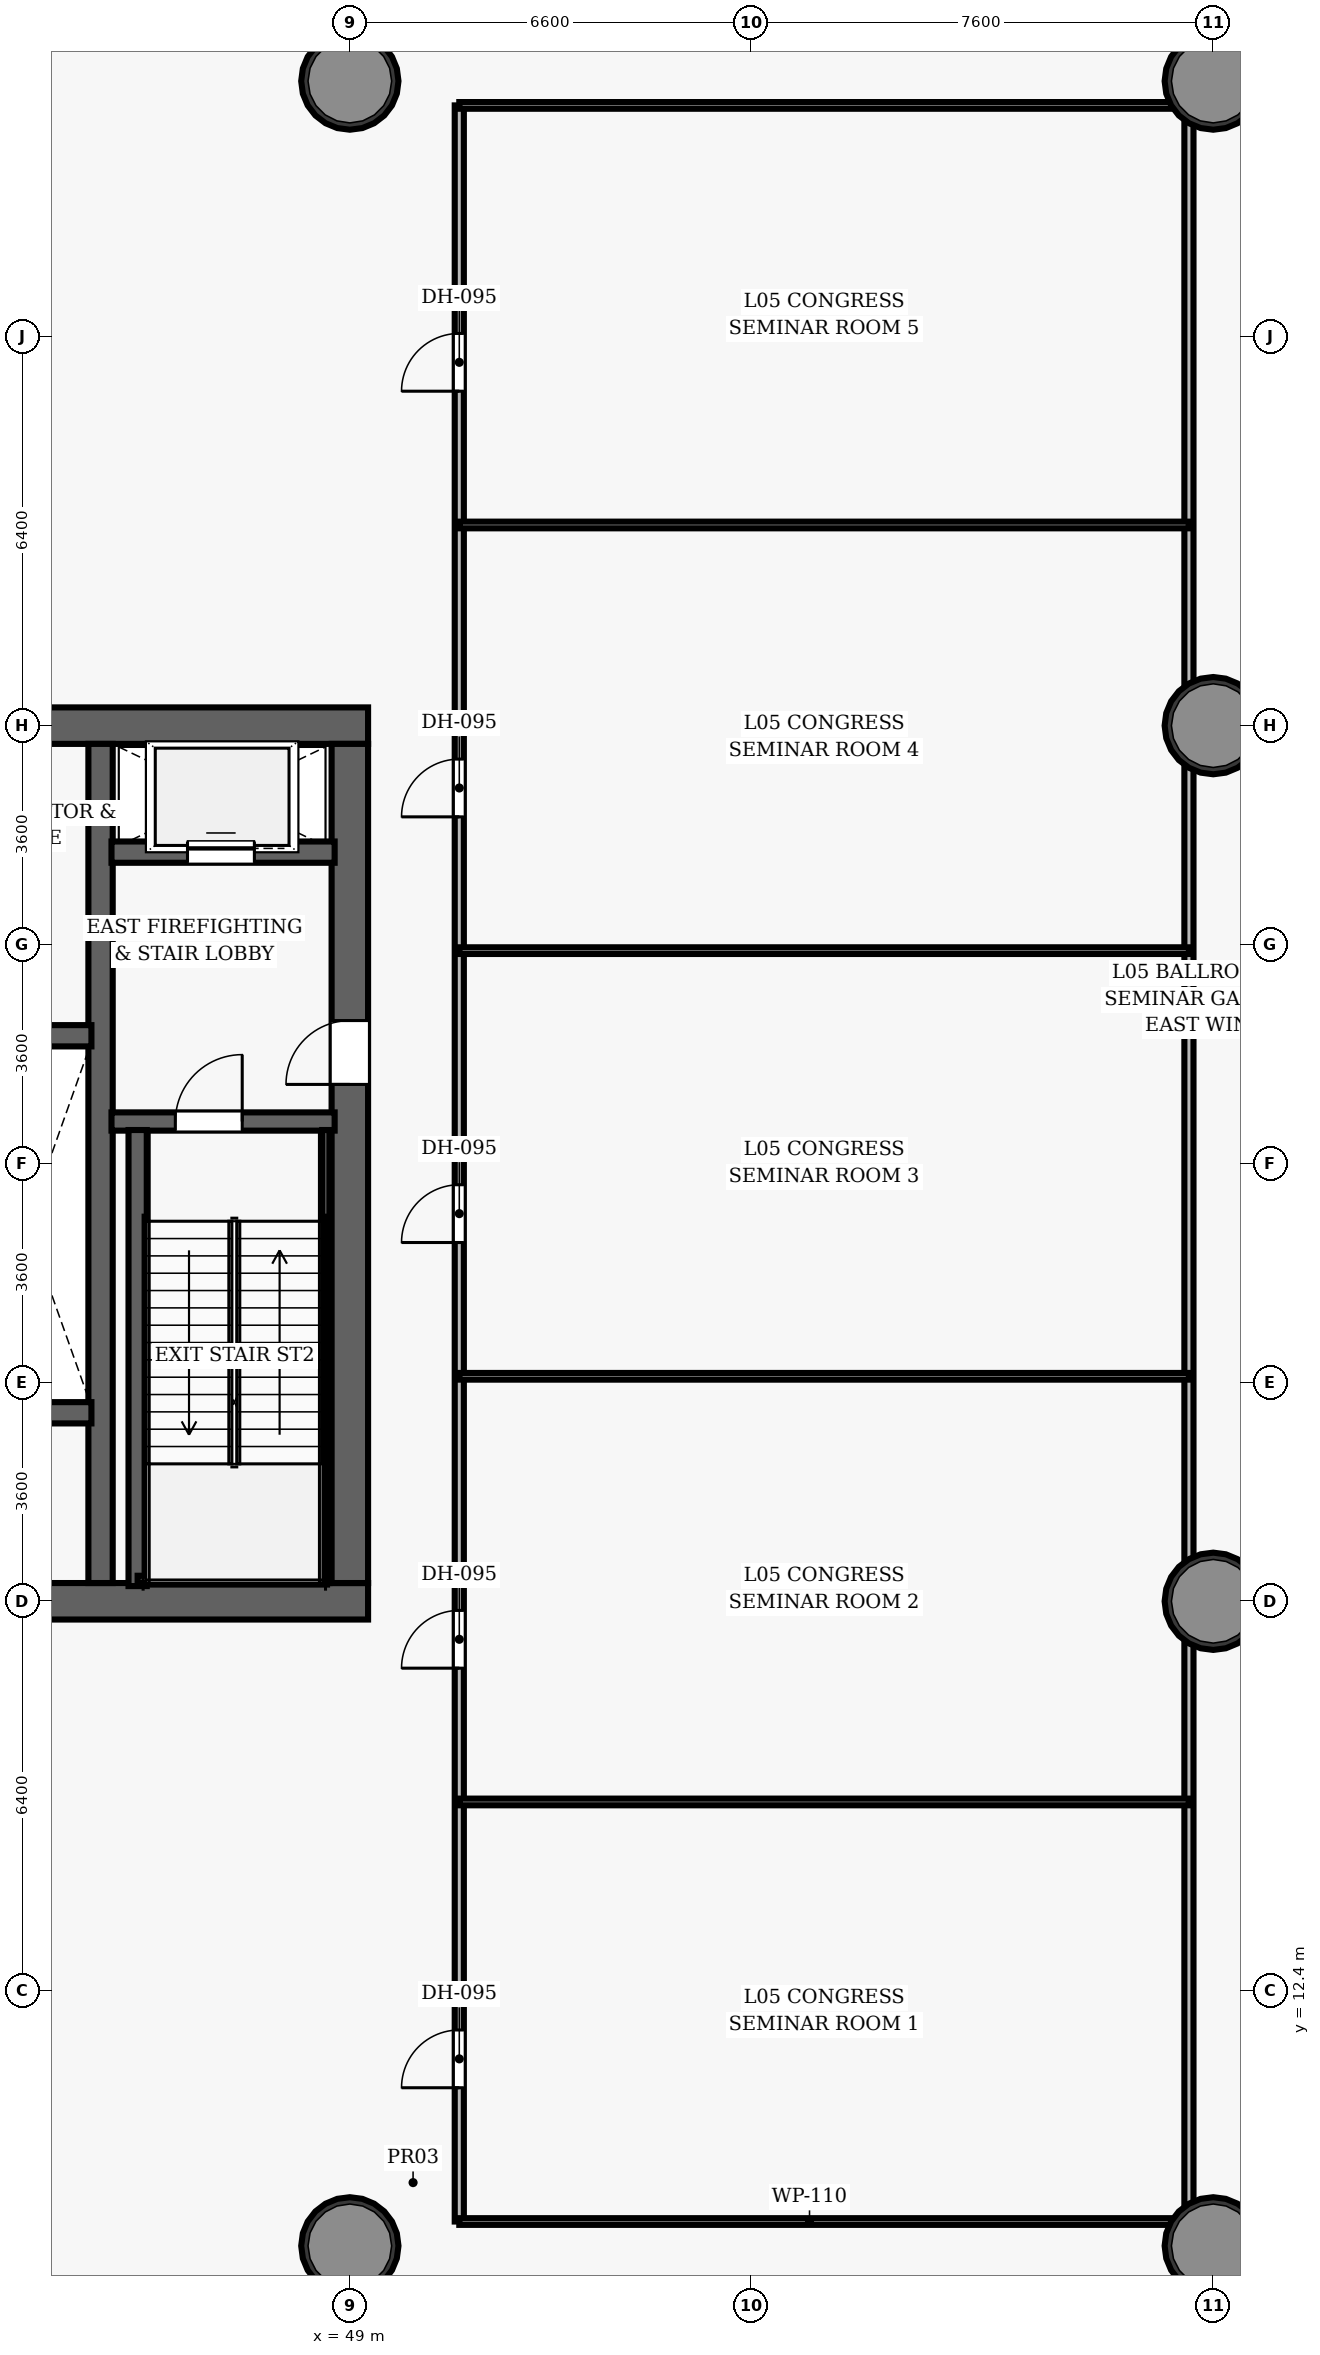
"""IFC4 building model, lengths in metres.
Left out: names, types, materials, properties, quantities, classifications, styles, units other than length and angle.
Written with IfcOpenShell. Run it as: python <this file> out.ifc"""

import sys

from ifc_helpers import new_model, si_unit, direction, frame, frame_2d, origin, origin_2d, place, context, subcontext, project, spatial, rectangle, hollow_circle, extrude, element, fill, save


model = new_model("IFC4")
c1 = context("Model", 3, precision=1e-05, world=origin(), true_north=direction((0.0, 1.0)))
c2 = subcontext(c1, "Body", "Model", "MODEL_VIEW")
j1 = project(units=[si_unit("LENGTHUNIT", "METRE"), si_unit("PLANEANGLEUNIT", "RADIAN")], contexts=[c1])
p1 = place(None, origin())
s1 = spatial("IfcSite", under=j1, at=p1, CompositionType="ELEMENT")
p2 = place(p1, origin())
s2 = spatial("IfcBuilding", under=s1, at=p2, CompositionType="ELEMENT")
p3 = place(p2, frame((0.0, 0.0, 30.0)))
s3 = spatial("IfcBuildingStorey", under=s2, at=p3, CompositionType="ELEMENT", Elevation=30.0)
p4 = place(p3, frame((26.7, 18.8, 0.0), z_axis=(0.0, 0.0, 1.0), x_axis=(1.0, 0.0, 0.0)))
e1 = element("IfcWall", 1, at=p4, inside=s3, PredefinedType="SHEAR", context=c2, shape_type="SweptSolid", body=[
    extrude(rectangle(XDim=22.6, YDim=0.6, at=frame_2d((11.3, 0.0))), origin(), (0.0, 0.0, 1.0), 5.4),
])
p5 = place(p4, frame((14.52, 0.0, 0.0)))
e2 = element("IfcOpeningElement", 2, at=p5, cuts=e1, PredefinedType="OPENING", context=c2, shape_type="SweptSolid", body=[
    extrude(rectangle(XDim=1.05, YDim=2.15, at=frame_2d((0.525, 1.075))), frame((0.0, 0.31, 0.0), z_axis=(0.0, -1.0, 0.0), x_axis=(1.0, 0.0, 0.0)), (0.0, 0.0, 1.0), 0.62),
])
p6 = place(p3, frame((26.7, 33.2, 0.0), z_axis=(0.0, 0.0, 1.0), x_axis=(1.0, 0.0, 0.0)))
e3 = element("IfcWall", 3, at=p6, inside=s3, PredefinedType="SHEAR", context=c2, shape_type="SweptSolid", body=[
    extrude(rectangle(XDim=22.6, YDim=0.6, at=frame_2d((11.3, 0.0))), origin(), (0.0, 0.0, 1.0), 5.4),
])
p7 = place(p6, frame((4.62, 0.0, 0.0)))
e4 = element("IfcOpeningElement", 4, at=p7, cuts=e3, PredefinedType="OPENING", context=c2, shape_type="SweptSolid", body=[
    extrude(rectangle(XDim=1.05, YDim=2.15, at=frame_2d((0.525, 1.075))), frame((0.0, 0.31, 0.0), z_axis=(0.0, -1.0, 0.0), x_axis=(1.0, 0.0, 0.0)), (0.0, 0.0, 1.0), 0.62),
])
p8 = place(p6, frame((14.52, 0.0, 0.0)))
e5 = element("IfcOpeningElement", 5, at=p8, cuts=e3, PredefinedType="OPENING", context=c2, shape_type="SweptSolid", body=[
    extrude(rectangle(XDim=1.05, YDim=2.15, at=frame_2d((0.525, 1.075))), frame((0.0, 0.31, 0.0), z_axis=(0.0, -1.0, 0.0), x_axis=(1.0, 0.0, 0.0)), (0.0, 0.0, 1.0), 0.62),
])
p9 = place(p3, frame((49.0, 19.1, 0.0), z_axis=(0.0, 0.0, 1.0), x_axis=(0.0, 1.0, 0.0)))
e6 = element("IfcWall", 6, at=p9, inside=s3, PredefinedType="SHEAR", context=c2, shape_type="SweptSolid", body=[
    extrude(rectangle(XDim=13.8, YDim=0.6, at=frame_2d((6.9, 0.0))), origin(), (0.0, 0.0, 1.0), 5.4),
])
p10 = place(p9, frame((8.2, 0.0, 0.0)))
e7 = element("IfcOpeningElement", 7, at=p10, cuts=e6, PredefinedType="OPENING", context=c2, shape_type="SweptSolid", body=[
    extrude(rectangle(XDim=1.05, YDim=2.15, at=frame_2d((0.525, 1.075))), frame((0.0, 0.31, 0.0), z_axis=(0.0, -1.0, 0.0), x_axis=(1.0, 0.0, 0.0)), (0.0, 0.0, 1.0), 0.62),
])
p11 = place(p3, frame((44.9, 19.1, 0.0), z_axis=(0.0, 0.0, 1.0), x_axis=(0.0, 1.0, 0.0)))
e8 = element("IfcWall", 8, at=p11, inside=s3, PredefinedType="SHEAR", context=c2, shape_type="SweptSolid", body=[
    extrude(rectangle(XDim=13.8, YDim=0.4, at=frame_2d((6.9, 0.0))), origin(), (0.0, 0.0, 1.0), 5.4),
])
for number, where, z_axis, x_axis in (
    (9, (49.0, 8.2, 0.0), (0.0, 0.0, 1.0), (1.0, 0.0, 0.0)),
    (10, (63.2, 8.2, 0.0), (0.0, 0.0, 1.0), (1.0, 0.0, 0.0)),
    (11, (63.2, 18.8, 0.0), (0.0, 0.0, 1.0), (1.0, 0.0, 0.0)),
    (12, (63.2, 33.2, 0.0), (0.0, 0.0, 1.0), (1.0, 0.0, 0.0)),
    (13, (49.0, 43.8, 0.0), (0.0, 0.0, 1.0), (1.0, 0.0, 0.0)),
    (14, (63.2, 43.8, 0.0), (0.0, 0.0, 1.0), (1.0, 0.0, 0.0)),
):
    element("IfcColumn", number, at=place(p3, frame(where, z_axis=z_axis, x_axis=x_axis)), inside=s3, PredefinedType="COLUMN", context=c2, shape_type="SweptSolid", body=[
        extrude(hollow_circle(Radius=0.8, WallThickness=0.06, at=origin_2d()), origin(), (0.0, 0.0, 1.0), 5.4),
    ])
p12 = place(p3, frame((45.08, 26.69, 0.0), z_axis=(0.0, 0.0, 1.0), x_axis=(1.0, 0.0, 0.0)))
e15 = element("IfcWall", 15, at=p12, inside=s3, PredefinedType="SHEAR", context=c2, shape_type="SweptSolid", body=[
    extrude(rectangle(XDim=3.67, YDim=0.3, at=frame_2d((1.835, 0.0))), origin(), (0.0, 0.0, 1.0), 5.4),
])
p13 = place(p12, frame((1.05, 0.0, 0.0)))
e16 = element("IfcOpeningElement", 16, at=p13, cuts=e15, PredefinedType="OPENING", context=c2, shape_type="SweptSolid", body=[
    extrude(rectangle(XDim=1.1, YDim=2.15, at=frame_2d((0.55, 1.075))), frame((0.0, 0.16, 0.0), z_axis=(0.0, -1.0, 0.0), x_axis=(1.0, 0.0, 0.0)), (0.0, 0.0, 1.0), 0.32),
])
p14 = place(p3, frame((45.51, 19.05, 0.0), z_axis=(0.0, 0.0, 1.0), x_axis=(0.0, 1.0, 0.0)))
e17 = element("IfcWall", 17, at=p14, inside=s3, PredefinedType="SHEAR", context=c2, shape_type="SweptSolid", body=[
    extrude(rectangle(XDim=7.5, YDim=0.3, at=frame_2d((3.75, 0.0))), origin(), (0.0, 0.0, 1.0), 5.4),
])
p15 = place(p3, frame((48.605, 19.1, 0.0), z_axis=(0.0, 0.0, 1.0), x_axis=(0.0, 1.0, 0.0)))
e18 = element("IfcWall", 18, at=p15, inside=s3, PredefinedType="SHEAR", context=c2, shape_type="SweptSolid", body=[
    extrude(rectangle(XDim=7.45, YDim=0.12, at=frame_2d((3.725, 0.0))), origin(), (0.0, 0.0, 1.0), 5.4),
])
p16 = place(p3, frame((45.51, 19.16, 0.0), z_axis=(0.0, 0.0, 1.0), x_axis=(1.0, 0.0, 0.0)))
e19 = element("IfcWall", 19, at=p16, inside=s3, PredefinedType="SHEAR", context=c2, shape_type="SweptSolid", body=[
    extrude(rectangle(XDim=3.095, YDim=0.12, at=frame_2d((1.547, 0.0))), origin(), (0.0, 0.0, 1.0), 5.4),
])
p17 = place(p3, frame((45.08, 31.12, 0.0), z_axis=(0.0, 0.0, 1.0), x_axis=(1.0, 0.0, 0.0)))
e20 = element("IfcWall", 20, at=p17, inside=s3, PredefinedType="SHEAR", context=c2, shape_type="SweptSolid", body=[
    extrude(rectangle(XDim=3.67, YDim=0.35, at=frame_2d((1.835, 0.0))), origin(), (0.0, 0.0, 1.0), 4.06),
])
p18 = place(p17, frame((1.25, 0.0, 0.0)))
e21 = element("IfcOpeningElement", 21, at=p18, cuts=e20, PredefinedType="OPENING", context=c2, shape_type="SweptSolid", body=[
    extrude(rectangle(XDim=1.1, YDim=2.15, at=frame_2d((0.55, 1.075))), frame((0.0, 0.185, 0.0), z_axis=(0.0, -1.0, 0.0), x_axis=(1.0, 0.0, 0.0)), (0.0, 0.0, 1.0), 0.37),
])
for number, where, z_axis, x_axis in (
    (22, (42.72, 21.9, 0.0), (0.0, 0.0, 1.0), (1.0, 0.0, 0.0)),
    (23, (42.72, 28.1, 0.0), (0.0, 0.0, 1.0), (1.0, 0.0, 0.0)),
):
    element("IfcWall", number, at=place(p3, frame(where, z_axis=z_axis, x_axis=x_axis)), inside=s3, PredefinedType="SHEAR", context=c2, shape_type="SweptSolid", body=[
        extrude(rectangle(XDim=2.03, YDim=0.35, at=frame_2d((1.015, 0.0))), origin(), (0.0, 0.0, 1.0), 4.06),
    ])
p19 = place(p3, frame((50.8, 8.6, 0.0), z_axis=(0.0, 0.0, 1.0), x_axis=(0.0, 1.0, 0.0)))
e24 = element("IfcWall", 24, at=p19, inside=s3, PredefinedType="PARTITIONING", context=c2, shape_type="SweptSolid", body=[
    extrude(rectangle(XDim=34.8, YDim=0.15, at=frame_2d((17.4, 0.0))), origin(), (0.0, 0.0, 1.0), 4.06),
])
p20 = place(p19, frame((2.2, 0.0, 0.0)))
e25 = element("IfcOpeningElement", 25, at=p20, cuts=e24, PredefinedType="OPENING", context=c2, shape_type="SweptSolid", body=[
    extrude(rectangle(XDim=0.95, YDim=2.15, at=frame_2d((0.475, 1.075))), frame((0.0, 0.085, 0.0), z_axis=(0.0, -1.0, 0.0), x_axis=(1.0, 0.0, 0.0)), (0.0, 0.0, 1.0), 0.17),
])
p21 = place(p19, frame((9.1, 0.0, 0.0)))
e26 = element("IfcOpeningElement", 26, at=p21, cuts=e24, PredefinedType="OPENING", context=c2, shape_type="SweptSolid", body=[
    extrude(rectangle(XDim=0.95, YDim=2.15, at=frame_2d((0.475, 1.075))), frame((0.0, 0.085, 0.0), z_axis=(0.0, -1.0, 0.0), x_axis=(1.0, 0.0, 0.0)), (0.0, 0.0, 1.0), 0.17),
])
p22 = place(p19, frame((16.1, 0.0, 0.0)))
e27 = element("IfcOpeningElement", 27, at=p22, cuts=e24, PredefinedType="OPENING", context=c2, shape_type="SweptSolid", body=[
    extrude(rectangle(XDim=0.95, YDim=2.15, at=frame_2d((0.475, 1.075))), frame((0.0, 0.085, 0.0), z_axis=(0.0, -1.0, 0.0), x_axis=(1.0, 0.0, 0.0)), (0.0, 0.0, 1.0), 0.17),
])
p23 = place(p19, frame((23.1, 0.0, 0.0)))
e28 = element("IfcOpeningElement", 28, at=p23, cuts=e24, PredefinedType="OPENING", context=c2, shape_type="SweptSolid", body=[
    extrude(rectangle(XDim=0.95, YDim=2.15, at=frame_2d((0.475, 1.075))), frame((0.0, 0.085, 0.0), z_axis=(0.0, -1.0, 0.0), x_axis=(1.0, 0.0, 0.0)), (0.0, 0.0, 1.0), 0.17),
])
p24 = place(p19, frame((30.1, 0.0, 0.0)))
e29 = element("IfcOpeningElement", 29, at=p24, cuts=e24, PredefinedType="OPENING", context=c2, shape_type="SweptSolid", body=[
    extrude(rectangle(XDim=0.95, YDim=2.15, at=frame_2d((0.475, 1.075))), frame((0.0, 0.085, 0.0), z_axis=(0.0, -1.0, 0.0), x_axis=(1.0, 0.0, 0.0)), (0.0, 0.0, 1.0), 0.17),
])
p25 = place(p3, frame((62.8, 8.6, 0.0), z_axis=(0.0, 0.0, 1.0), x_axis=(0.0, 1.0, 0.0)))
e30 = element("IfcWall", 30, at=p25, inside=s3, PredefinedType="PARTITIONING", context=c2, shape_type="SweptSolid", body=[
    extrude(rectangle(XDim=34.8, YDim=0.15, at=frame_2d((17.4, 0.0))), origin(), (0.0, 0.0, 1.0), 4.06),
])
for number, where, z_axis, x_axis in (
    (31, (50.8, 8.6, 0.0), (0.0, 0.0, 1.0), (1.0, 0.0, 0.0)),
    (32, (50.8, 15.5, 0.0), (0.0, 0.0, 1.0), (1.0, 0.0, 0.0)),
    (33, (50.8, 22.5, 0.0), (0.0, 0.0, 1.0), (1.0, 0.0, 0.0)),
    (34, (50.8, 29.5, 0.0), (0.0, 0.0, 1.0), (1.0, 0.0, 0.0)),
    (35, (50.8, 36.5, 0.0), (0.0, 0.0, 1.0), (1.0, 0.0, 0.0)),
    (36, (50.8, 43.4, 0.0), (0.0, 0.0, 1.0), (1.0, 0.0, 0.0)),
):
    element("IfcWall", number, at=place(p3, frame(where, z_axis=z_axis, x_axis=x_axis)), inside=s3, PredefinedType="PARTITIONING", context=c2, shape_type="SweptSolid", body=[
        extrude(rectangle(XDim=12.0, YDim=0.11, at=frame_2d((6.0, 0.0))), origin(), (0.0, 0.0, 1.0), 4.06),
    ])
p26 = place(p13, origin())
e37 = element("IfcDoor", 37, at=p26, inside=s3, OperationType="SINGLE_SWING_RIGHT", PredefinedType="DOOR", context=c2, shape_type="SweptSolid", body=[
    extrude(rectangle(XDim=1.1, YDim=2.15, at=frame_2d((0.55, 1.075))), frame((0.0, 0.025, 0.0), z_axis=(0.0, -1.0, 0.0), x_axis=(1.0, 0.0, 0.0)), (0.0, 0.0, 1.0), 0.05),
])
fill(e16, e37)
p27 = place(p10, origin())
e38 = element("IfcDoor", 38, at=p27, inside=s3, OperationType="SINGLE_SWING_LEFT", PredefinedType="DOOR", context=c2, shape_type="SweptSolid", body=[
    extrude(rectangle(XDim=1.05, YDim=2.15, at=frame_2d((0.525, 1.075))), frame((0.0, 0.025, 0.0), z_axis=(0.0, -1.0, 0.0), x_axis=(1.0, 0.0, 0.0)), (0.0, 0.0, 1.0), 0.05),
])
fill(e7, e38)
p28 = place(p20, origin())
e39 = element("IfcDoor", 39, at=p28, inside=s3, OperationType="SINGLE_SWING_LEFT", PredefinedType="DOOR", context=c2, shape_type="SweptSolid", body=[
    extrude(rectangle(XDim=0.95, YDim=2.15, at=frame_2d((0.475, 1.075))), frame((0.0, 0.025, 0.0), z_axis=(0.0, -1.0, 0.0), x_axis=(1.0, 0.0, 0.0)), (0.0, 0.0, 1.0), 0.05),
])
fill(e25, e39)
p29 = place(p21, origin())
e40 = element("IfcDoor", 40, at=p29, inside=s3, OperationType="SINGLE_SWING_LEFT", PredefinedType="DOOR", context=c2, shape_type="SweptSolid", body=[
    extrude(rectangle(XDim=0.95, YDim=2.15, at=frame_2d((0.475, 1.075))), frame((0.0, 0.025, 0.0), z_axis=(0.0, -1.0, 0.0), x_axis=(1.0, 0.0, 0.0)), (0.0, 0.0, 1.0), 0.05),
])
fill(e26, e40)
p30 = place(p22, origin())
e41 = element("IfcDoor", 41, at=p30, inside=s3, OperationType="SINGLE_SWING_LEFT", PredefinedType="DOOR", context=c2, shape_type="SweptSolid", body=[
    extrude(rectangle(XDim=0.95, YDim=2.15, at=frame_2d((0.475, 1.075))), frame((0.0, 0.025, 0.0), z_axis=(0.0, -1.0, 0.0), x_axis=(1.0, 0.0, 0.0)), (0.0, 0.0, 1.0), 0.05),
])
fill(e27, e41)
p31 = place(p23, origin())
e42 = element("IfcDoor", 42, at=p31, inside=s3, OperationType="SINGLE_SWING_LEFT", PredefinedType="DOOR", context=c2, shape_type="SweptSolid", body=[
    extrude(rectangle(XDim=0.95, YDim=2.15, at=frame_2d((0.475, 1.075))), frame((0.0, 0.025, 0.0), z_axis=(0.0, -1.0, 0.0), x_axis=(1.0, 0.0, 0.0)), (0.0, 0.0, 1.0), 0.05),
])
fill(e28, e42)
p32 = place(p24, origin())
e43 = element("IfcDoor", 43, at=p32, inside=s3, OperationType="SINGLE_SWING_LEFT", PredefinedType="DOOR", context=c2, shape_type="SweptSolid", body=[
    extrude(rectangle(XDim=0.95, YDim=2.15, at=frame_2d((0.475, 1.075))), frame((0.0, 0.025, 0.0), z_axis=(0.0, -1.0, 0.0), x_axis=(1.0, 0.0, 0.0)), (0.0, 0.0, 1.0), 0.05),
])
fill(e29, e43)
p33 = place(p18, origin())
e44 = element("IfcDoor", 44, at=p33, inside=s3, OperationType="SLIDING_TO_LEFT", PredefinedType="DOOR", context=c2, shape_type="SweptSolid", body=[
    extrude(rectangle(XDim=1.1, YDim=2.15, at=frame_2d((0.55, 1.075))), frame((0.0, 0.025, 0.0), z_axis=(0.0, -1.0, 0.0), x_axis=(1.0, 0.0, 0.0)), (0.0, 0.0, 1.0), 0.05),
])
fill(e21, e44)
save(model, sys.argv[1])
